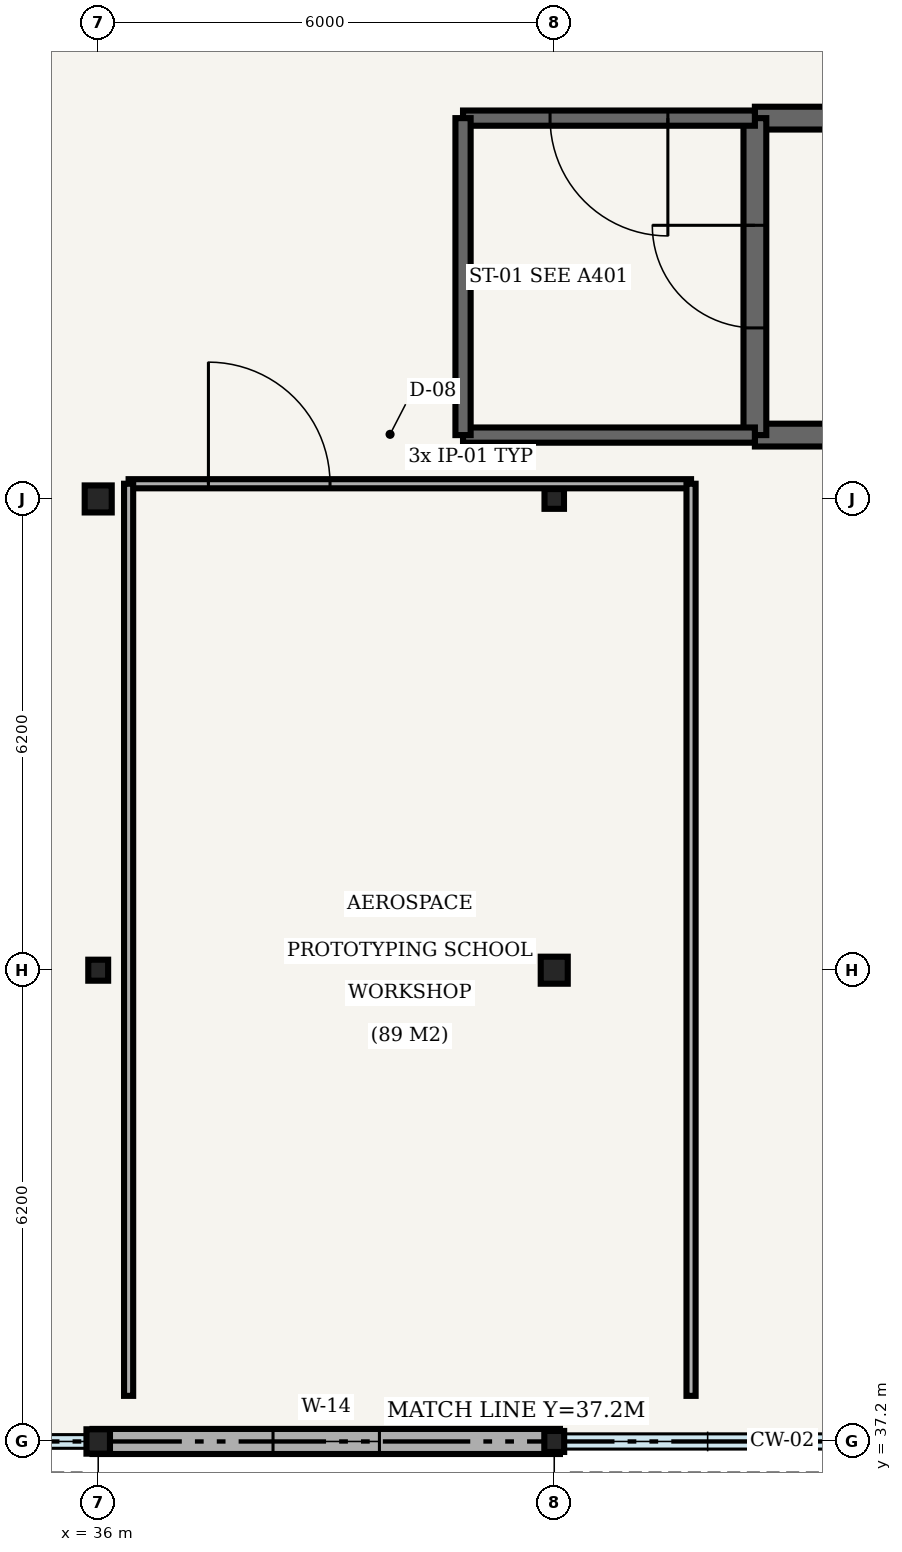
"""IFC4 building model, lengths in metres.
Left out: names, types, materials, properties, quantities, classifications, styles, units other than length and angle.
Written with IfcOpenShell. Run it as: python <this file> out.ifc"""

import sys

from ifc_helpers import new_model, si_unit, direction, frame, frame_2d, origin, origin_2d, place, context, subcontext, project, spatial, rectangle, hollow_circle, i_section, extrude, element, fill, save


model = new_model("IFC4")
c1 = context("Model", 3, precision=1e-05, world=origin(), true_north=direction((0.0, 1.0)))
c2 = subcontext(c1, "Body", "Model", "MODEL_VIEW")
j1 = project(units=[si_unit("LENGTHUNIT", "METRE"), si_unit("PLANEANGLEUNIT", "RADIAN")], contexts=[c1])
p1 = place(None, origin())
s1 = spatial("IfcSite", under=j1, at=p1, CompositionType="ELEMENT")
p2 = place(p1, origin())
s2 = spatial("IfcBuilding", under=s1, at=p2, CompositionType="ELEMENT")
p3 = place(p2, frame((0.0, 0.0, 10.8)))
s3 = spatial("IfcBuildingStorey", under=s2, at=p3, CompositionType="ELEMENT", Elevation=10.8)
p4 = place(p3, frame((36.0, 37.2, 0.0), z_axis=(0.0, 0.0, 1.0), x_axis=(1.0, 0.0, 0.0)))
e1 = element("IfcColumn", 1, at=p4, inside=s3, PredefinedType="COLUMN", context=c2, shape_type="SweptSolid", body=[
    extrude(i_section(OverallWidth=0.309, OverallDepth=0.321, WebThickness=0.014, FlangeThickness=0.022, FilletRadius=0.015, at=origin_2d()), origin(), (0.0, 0.0, 1.0), 4.8),
])
p5 = place(p3, frame((36.0, 43.4, 0.0), z_axis=(0.0, 0.0, 1.0), x_axis=(1.0, 0.0, 0.0)))
e2 = element("IfcColumn", 2, at=p5, inside=s3, PredefinedType="COLUMN", context=c2, shape_type="SweptSolid", body=[
    extrude(i_section(OverallWidth=0.261, OverallDepth=0.276, WebThickness=0.015, FlangeThickness=0.025, FilletRadius=0.013, at=origin_2d()), origin(), (0.0, 0.0, 1.0), 4.8),
])
p6 = place(p3, frame((36.0, 49.6, 0.0), z_axis=(0.0, 0.0, 1.0), x_axis=(1.0, 0.0, 0.0)))
e3 = element("IfcColumn", 3, at=p6, inside=s3, PredefinedType="COLUMN", context=c2, shape_type="SweptSolid", body=[
    extrude(hollow_circle(Radius=0.178, WallThickness=0.012, at=origin_2d()), origin(), (0.0, 0.0, 1.0), 4.8),
])
p7 = place(p3, frame((42.0, 37.2, 0.0), z_axis=(0.0, 0.0, 1.0), x_axis=(1.0, 0.0, 0.0)))
e4 = element("IfcColumn", 4, at=p7, inside=s3, PredefinedType="COLUMN", context=c2, shape_type="SweptSolid", body=[
    extrude(i_section(OverallWidth=0.261, OverallDepth=0.276, WebThickness=0.015, FlangeThickness=0.025, FilletRadius=0.013, at=origin_2d()), origin(), (0.0, 0.0, 1.0), 4.8),
])
p8 = place(p3, frame((42.0, 43.4, 0.0), z_axis=(0.0, 0.0, 1.0), x_axis=(1.0, 0.0, 0.0)))
e5 = element("IfcColumn", 5, at=p8, inside=s3, PredefinedType="COLUMN", context=c2, shape_type="SweptSolid", body=[
    extrude(hollow_circle(Radius=0.178, WallThickness=0.012, at=origin_2d()), origin(), (0.0, 0.0, 1.0), 4.8),
])
p9 = place(p3, frame((42.0, 49.6, 0.0), z_axis=(0.0, 0.0, 1.0), x_axis=(1.0, 0.0, 0.0)))
e6 = element("IfcColumn", 6, at=p9, inside=s3, PredefinedType="COLUMN", context=c2, shape_type="SweptSolid", body=[
    extrude(i_section(OverallWidth=0.256, OverallDepth=0.26, WebThickness=0.01, FlangeThickness=0.017, FilletRadius=0.013, at=origin_2d()), origin(), (0.0, 0.0, 1.0), 4.8),
])
p10 = place(p3, frame((35.925, 37.2, 0.0), z_axis=(0.0, 0.0, 1.0), x_axis=(1.0, 0.0, 0.0)))
e7 = element("IfcWall", 7, at=p10, inside=s3, PredefinedType="SOLIDWALL", context=c2, shape_type="SweptSolid", body=[
    extrude(rectangle(XDim=6.15, YDim=0.33, at=frame_2d((3.075, 0.0))), origin(), (0.0, 0.0, 1.0), 3.84),
])
p11 = place(p10, frame((2.375, 0.0, 0.9)))
e8 = element("IfcOpeningElement", 8, at=p11, cuts=e7, PredefinedType="OPENING", context=c2, shape_type="SweptSolid", body=[
    extrude(rectangle(XDim=1.4, YDim=1.5, at=frame_2d((0.7, 0.75))), frame((0.0, 0.175, 0.0), z_axis=(0.0, -1.0, 0.0), x_axis=(1.0, 0.0, 0.0)), (0.0, 0.0, 1.0), 0.35),
])
for number, where, z_axis, x_axis in (
    (9, (44.64, 50.44, 0.0), (0.0, 0.0, 1.0), (1.0, 0.0, 0.0)),
    (10, (53.16, 54.61, 0.0), (0.0, 0.0, 1.0), (-1.0, 0.0, 0.0)),
):
    element("IfcWall", number, at=place(p3, frame(where, z_axis=z_axis, x_axis=x_axis)), inside=s3, PredefinedType="SHEAR", context=c2, shape_type="SweptSolid", body=[
        extrude(rectangle(XDim=8.52, YDim=0.3, at=frame_2d((4.26, 0.0))), origin(), (0.0, 0.0, 1.0), 4.55),
    ])
p12 = place(p3, frame((44.64, 54.61, 0.0), z_axis=(0.0, 0.0, 1.0), x_axis=(0.0, -1.0, 0.0)))
e11 = element("IfcWall", 11, at=p12, inside=s3, PredefinedType="SHEAR", context=c2, shape_type="SweptSolid", body=[
    extrude(rectangle(XDim=4.17, YDim=0.3, at=frame_2d((2.085, 0.0))), origin(), (0.0, 0.0, 1.0), 4.55),
])
p13 = place(p12, frame((1.41, 0.0, 0.0)))
e12 = element("IfcOpeningElement", 12, at=p13, cuts=e11, PredefinedType="OPENING", context=c2, shape_type="SweptSolid", body=[
    extrude(rectangle(XDim=1.35, YDim=2.2, at=frame_2d((0.675, 1.1))), frame((0.0, 0.16, 0.0), z_axis=(0.0, -1.0, 0.0), x_axis=(1.0, 0.0, 0.0)), (0.0, 0.0, 1.0), 0.32),
])
p14 = place(p3, frame((40.8, 50.44, 0.0), z_axis=(0.0, 0.0, 1.0), x_axis=(1.0, 0.0, 0.0)))
e13 = element("IfcWall", 13, at=p14, inside=s3, PredefinedType="SHEAR", context=c2, shape_type="SweptSolid", body=[
    extrude(rectangle(XDim=3.84, YDim=0.2, at=frame_2d((1.92, 0.0))), origin(), (0.0, 0.0, 1.0), 4.55),
])
p15 = place(p3, frame((44.64, 54.61, 0.0), z_axis=(0.0, 0.0, 1.0), x_axis=(-1.0, 0.0, 0.0)))
e14 = element("IfcWall", 14, at=p15, inside=s3, PredefinedType="SHEAR", context=c2, shape_type="SweptSolid", body=[
    extrude(rectangle(XDim=3.84, YDim=0.2, at=frame_2d((1.92, 0.0))), origin(), (0.0, 0.0, 1.0), 4.55),
])
p16 = place(p15, frame((1.145, 0.0, 0.0)))
e15 = element("IfcOpeningElement", 15, at=p16, cuts=e14, PredefinedType="OPENING", context=c2, shape_type="SweptSolid", body=[
    extrude(rectangle(XDim=1.55, YDim=2.2, at=frame_2d((0.775, 1.1))), frame((0.0, 0.11, 0.0), z_axis=(0.0, -1.0, 0.0), x_axis=(1.0, 0.0, 0.0)), (0.0, 0.0, 1.0), 0.22),
])
p17 = place(p3, frame((40.8, 54.61, 0.0), z_axis=(0.0, 0.0, 1.0), x_axis=(0.0, -1.0, 0.0)))
e16 = element("IfcWall", 16, at=p17, inside=s3, PredefinedType="SHEAR", context=c2, shape_type="SweptSolid", body=[
    extrude(rectangle(XDim=4.17, YDim=0.2, at=frame_2d((2.085, 0.0))), origin(), (0.0, 0.0, 1.0), 4.55),
])
p18 = place(p3, frame((36.4, 49.8, 0.0), z_axis=(0.0, 0.0, 1.0), x_axis=(1.0, 0.0, 0.0)))
e17 = element("IfcWall", 17, at=p18, inside=s3, PredefinedType="PARTITIONING", context=c2, shape_type="SweptSolid", body=[
    extrude(rectangle(XDim=7.4, YDim=0.12, at=frame_2d((3.7, 0.0))), origin(), (0.0, 0.0, 1.0), 3.52),
])
p19 = place(p18, frame((1.05, 0.0, 0.0)))
e18 = element("IfcOpeningElement", 18, at=p19, cuts=e17, PredefinedType="OPENING", context=c2, shape_type="SweptSolid", body=[
    extrude(rectangle(XDim=1.6, YDim=2.1, at=frame_2d((0.8, 1.05))), frame((0.0, 0.07, 0.0), z_axis=(0.0, -1.0, 0.0), x_axis=(1.0, 0.0, 0.0)), (0.0, 0.0, 1.0), 0.14),
])
for number, where, z_axis, x_axis in (
    (19, (43.8, 49.8, 0.0), (0.0, 0.0, 1.0), (0.0, -1.0, 0.0)),
    (20, (36.4, 37.8, 0.0), (0.0, 0.0, 1.0), (0.0, 1.0, 0.0)),
):
    element("IfcWall", number, at=place(p3, frame(where, z_axis=z_axis, x_axis=x_axis)), inside=s3, PredefinedType="PARTITIONING", context=c2, shape_type="SweptSolid", body=[
        extrude(rectangle(XDim=12.0, YDim=0.12, at=frame_2d((6.0, 0.0))), origin(), (0.0, 0.0, 1.0), 3.52),
    ])
p20 = place(p11, origin())
e21 = element("IfcWindow", 21, at=p20, inside=s3, PartitioningType="SINGLE_PANEL", PredefinedType="WINDOW", context=c2, shape_type="SweptSolid", body=[
    extrude(rectangle(XDim=1.4, YDim=1.5, at=frame_2d((0.7, 0.75))), frame((0.0, 0.03, 0.0), z_axis=(0.0, -1.0, 0.0), x_axis=(1.0, 0.0, 0.0)), (0.0, 0.0, 1.0), 0.06),
])
fill(e8, e21)
p21 = place(p13, origin())
e22 = element("IfcDoor", 22, at=p21, inside=s3, OperationType="SINGLE_SWING_RIGHT", PredefinedType="DOOR", context=c2, shape_type="SweptSolid", body=[
    extrude(rectangle(XDim=1.35, YDim=2.2, at=frame_2d((0.675, 1.1))), frame((0.0, 0.025, 0.0), z_axis=(0.0, -1.0, 0.0), x_axis=(1.0, 0.0, 0.0)), (0.0, 0.0, 1.0), 0.05),
])
fill(e12, e22)
p22 = place(p16, origin())
e23 = element("IfcDoor", 23, at=p22, inside=s3, OperationType="SINGLE_SWING_LEFT", PredefinedType="DOOR", context=c2, shape_type="SweptSolid", body=[
    extrude(rectangle(XDim=1.55, YDim=2.2, at=frame_2d((0.775, 1.1))), frame((0.0, 0.025, 0.0), z_axis=(0.0, -1.0, 0.0), x_axis=(1.0, 0.0, 0.0)), (0.0, 0.0, 1.0), 0.05),
])
fill(e15, e23)
p23 = place(p19, origin())
e24 = element("IfcDoor", 24, at=p23, inside=s3, OperationType="DOUBLE_DOOR_SINGLE_SWING", PredefinedType="DOOR", context=c2, shape_type="SweptSolid", body=[
    extrude(rectangle(XDim=1.6, YDim=2.1, at=frame_2d((0.8, 1.05))), frame((0.0, 0.025, 0.0), z_axis=(0.0, -1.0, 0.0), x_axis=(1.0, 0.0, 0.0)), (0.0, 0.0, 1.0), 0.05),
])
fill(e18, e24)
save(model, sys.argv[1])
